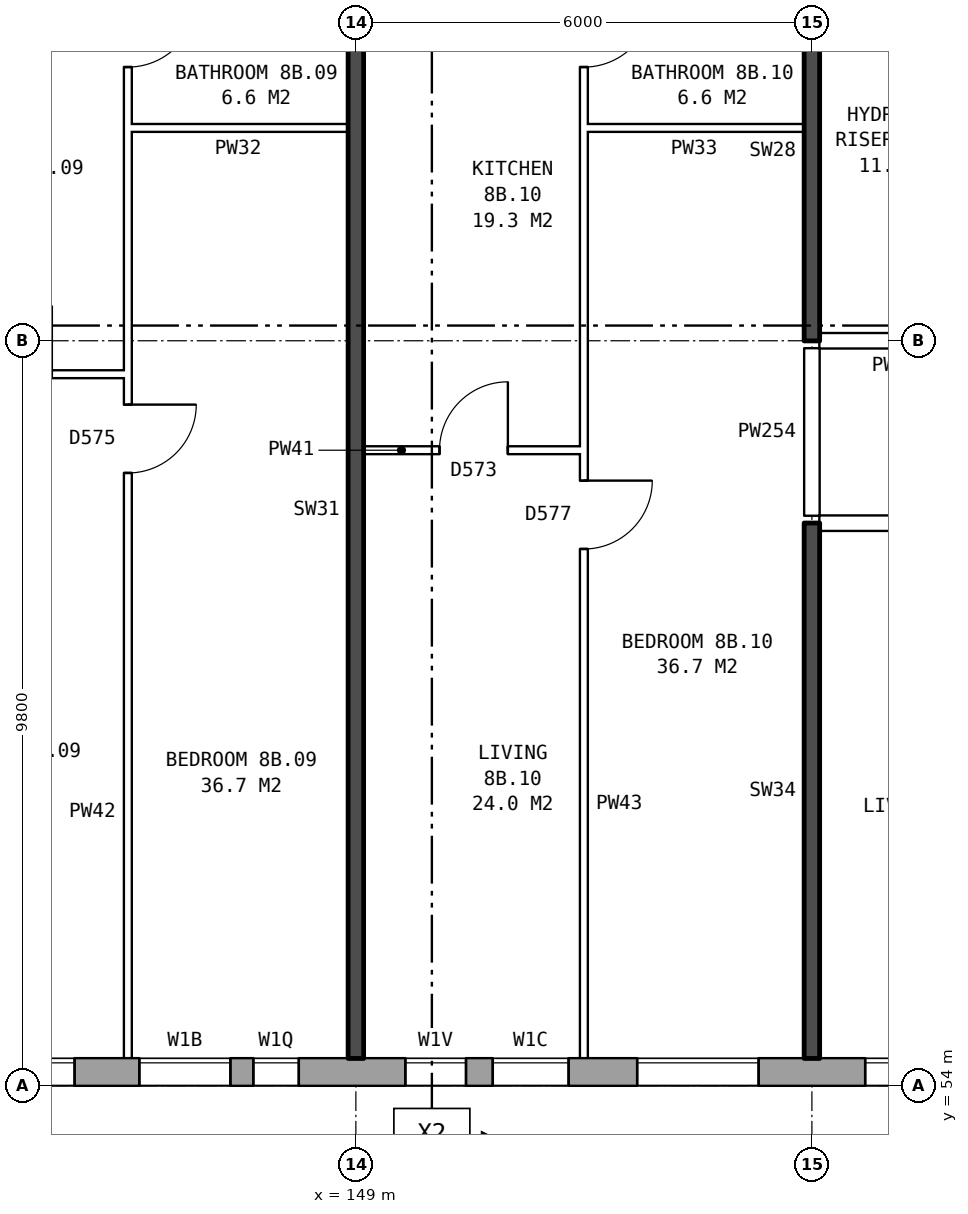
"""IFC4 building model, lengths in metres.
Left out: names, types, materials, properties, quantities, classifications, styles, units other than length and angle.
Written with IfcOpenShell. Run it as: python <this file> out.ifc"""

import sys

from ifc_helpers import new_model, si_unit, direction, frame, frame_2d, origin, place, context, subcontext, project, spatial, rectangle, extrude, element, fill, save


model = new_model("IFC4")
c1 = context("Model", 3, precision=1e-05, world=origin(), true_north=direction((0.0, 1.0)))
c2 = subcontext(c1, "Body", "Model", "MODEL_VIEW")
j1 = project(units=[si_unit("LENGTHUNIT", "METRE"), si_unit("PLANEANGLEUNIT", "RADIAN")], contexts=[c1])
p1 = place(None, origin())
s1 = spatial("IfcSite", under=j1, at=p1, CompositionType="ELEMENT")
p2 = place(p1, origin())
s2 = spatial("IfcBuilding", under=s1, at=p2, CompositionType="ELEMENT")
p3 = place(p2, frame((0.0, 0.0, 31.9)))
s3 = spatial("IfcBuildingStorey", under=s2, at=p3, CompositionType="ELEMENT", Elevation=31.9)
p4 = place(p3, frame((134.075, 54.18, 0.0), z_axis=(0.0, 0.0, 1.0), x_axis=(1.0, 0.0, 0.0)))
e1 = element("IfcWall", 1, at=p4, inside=s3, PredefinedType="STANDARD", context=c2, shape_type="SweptSolid", body=[
    extrude(rectangle(XDim=40.601, YDim=0.36, at=frame_2d((20.3, 0.0))), origin(), (0.0, 0.0, 1.0), 2.85),
])
p5 = place(p4, frame((0.625, 0.0, 0.8)))
e2 = element("IfcOpeningElement", 2, at=p5, cuts=e1, PredefinedType="OPENING", context=c2, shape_type="SweptSolid", body=[
    extrude(rectangle(XDim=1.6, YDim=1.8, at=frame_2d((0.8, 0.9))), frame((0.0, 0.19, 0.0), z_axis=(0.0, -1.0, 0.0), x_axis=(1.0, 0.0, 0.0)), (0.0, 0.0, 1.0), 0.38),
])
p6 = place(p4, frame((3.625, 0.0, 0.8)))
e3 = element("IfcOpeningElement", 3, at=p6, cuts=e1, PredefinedType="OPENING", context=c2, shape_type="SweptSolid", body=[
    extrude(rectangle(XDim=1.6, YDim=1.8, at=frame_2d((0.8, 0.9))), frame((0.0, 0.19, 0.0), z_axis=(0.0, -1.0, 0.0), x_axis=(1.0, 0.0, 0.0)), (0.0, 0.0, 1.0), 0.38),
])
p7 = place(p4, frame((6.625, 0.0, 0.8)))
e4 = element("IfcOpeningElement", 4, at=p7, cuts=e1, PredefinedType="OPENING", context=c2, shape_type="SweptSolid", body=[
    extrude(rectangle(XDim=1.6, YDim=1.8, at=frame_2d((0.8, 0.9))), frame((0.0, 0.19, 0.0), z_axis=(0.0, -1.0, 0.0), x_axis=(1.0, 0.0, 0.0)), (0.0, 0.0, 1.0), 0.38),
])
p8 = place(p4, frame((9.625, 0.0, 0.8)))
e5 = element("IfcOpeningElement", 5, at=p8, cuts=e1, PredefinedType="OPENING", context=c2, shape_type="SweptSolid", body=[
    extrude(rectangle(XDim=1.6, YDim=1.8, at=frame_2d((0.8, 0.9))), frame((0.0, 0.19, 0.0), z_axis=(0.0, -1.0, 0.0), x_axis=(1.0, 0.0, 0.0)), (0.0, 0.0, 1.0), 0.38),
])
p9 = place(p4, frame((12.075, 0.0, 0.8)))
e6 = element("IfcOpeningElement", 6, at=p9, cuts=e1, PredefinedType="OPENING", context=c2, shape_type="SweptSolid", body=[
    extrude(rectangle(XDim=1.2, YDim=1.8, at=frame_2d((0.6, 0.9))), frame((0.0, 0.19, 0.0), z_axis=(0.0, -1.0, 0.0), x_axis=(1.0, 0.0, 0.0)), (0.0, 0.0, 1.0), 0.38),
])
p10 = place(p4, frame((15.575, 0.0, 0.65)))
e7 = element("IfcOpeningElement", 7, at=p10, cuts=e1, PredefinedType="OPENING", context=c2, shape_type="SweptSolid", body=[
    extrude(rectangle(XDim=0.8, YDim=0.9, at=frame_2d((0.4, 0.45))), frame((0.0, 0.19, 0.0), z_axis=(0.0, -1.0, 0.0), x_axis=(1.0, 0.0, 0.0)), (0.0, 0.0, 1.0), 0.38),
])
p11 = place(p4, frame((18.625, 0.0, 0.8)))
e8 = element("IfcOpeningElement", 8, at=p11, cuts=e1, PredefinedType="OPENING", context=c2, shape_type="SweptSolid", body=[
    extrude(rectangle(XDim=1.6, YDim=1.8, at=frame_2d((0.8, 0.9))), frame((0.0, 0.19, 0.0), z_axis=(0.0, -1.0, 0.0), x_axis=(1.0, 0.0, 0.0)), (0.0, 0.0, 1.0), 0.38),
])
p12 = place(p4, frame((21.625, 0.0, 0.8)))
e9 = element("IfcOpeningElement", 9, at=p12, cuts=e1, PredefinedType="OPENING", context=c2, shape_type="SweptSolid", body=[
    extrude(rectangle(XDim=1.6, YDim=1.8, at=frame_2d((0.8, 0.9))), frame((0.0, 0.19, 0.0), z_axis=(0.0, -1.0, 0.0), x_axis=(1.0, 0.0, 0.0)), (0.0, 0.0, 1.0), 0.38),
])
p13 = place(p4, frame((23.525, 0.0, 0.8)))
e10 = element("IfcOpeningElement", 10, at=p13, cuts=e1, PredefinedType="OPENING", context=c2, shape_type="SweptSolid", body=[
    extrude(rectangle(XDim=1.2, YDim=0.9, at=frame_2d((0.6, 0.45))), frame((0.0, 0.19, 0.0), z_axis=(0.0, -1.0, 0.0), x_axis=(1.0, 0.0, 0.0)), (0.0, 0.0, 1.0), 0.38),
])
p14 = place(p4, frame((27.625, 0.0, 0.8)))
e11 = element("IfcOpeningElement", 11, at=p14, cuts=e1, PredefinedType="OPENING", context=c2, shape_type="SweptSolid", body=[
    extrude(rectangle(XDim=1.6, YDim=1.8, at=frame_2d((0.8, 0.9))), frame((0.0, 0.19, 0.0), z_axis=(0.0, -1.0, 0.0), x_axis=(1.0, 0.0, 0.0)), (0.0, 0.0, 1.0), 0.38),
])
p15 = place(p4, frame((30.625, 0.0, 0.8)))
e12 = element("IfcOpeningElement", 12, at=p15, cuts=e1, PredefinedType="OPENING", context=c2, shape_type="SweptSolid", body=[
    extrude(rectangle(XDim=1.6, YDim=1.8, at=frame_2d((0.8, 0.9))), frame((0.0, 0.19, 0.0), z_axis=(0.0, -1.0, 0.0), x_axis=(1.0, 0.0, 0.0)), (0.0, 0.0, 1.0), 0.38),
])
p16 = place(p4, frame((33.625, 0.0, 0.8)))
e13 = element("IfcOpeningElement", 13, at=p16, cuts=e1, PredefinedType="OPENING", context=c2, shape_type="SweptSolid", body=[
    extrude(rectangle(XDim=1.6, YDim=1.8, at=frame_2d((0.8, 0.9))), frame((0.0, 0.19, 0.0), z_axis=(0.0, -1.0, 0.0), x_axis=(1.0, 0.0, 0.0)), (0.0, 0.0, 1.0), 0.38),
])
p17 = place(p4, frame((36.625, 0.0, 0.8)))
e14 = element("IfcOpeningElement", 14, at=p17, cuts=e1, PredefinedType="OPENING", context=c2, shape_type="SweptSolid", body=[
    extrude(rectangle(XDim=1.6, YDim=1.8, at=frame_2d((0.8, 0.9))), frame((0.0, 0.19, 0.0), z_axis=(0.0, -1.0, 0.0), x_axis=(1.0, 0.0, 0.0)), (0.0, 0.0, 1.0), 0.38),
])
p18 = place(p4, frame((13.575, 0.0, 1.4)))
e15 = element("IfcOpeningElement", 15, at=p18, cuts=e1, PredefinedType="OPENING", context=c2, shape_type="SweptSolid", body=[
    extrude(rectangle(XDim=0.6, YDim=1.2, at=frame_2d((0.3, 0.6))), frame((0.0, 0.19, 0.0), z_axis=(0.0, -1.0, 0.0), x_axis=(1.0, 0.0, 0.0)), (0.0, 0.0, 1.0), 0.38),
])
p19 = place(p4, frame((16.725, 0.0, 0.65)))
e16 = element("IfcOpeningElement", 16, at=p19, cuts=e1, PredefinedType="OPENING", context=c2, shape_type="SweptSolid", body=[
    extrude(rectangle(XDim=1.0, YDim=1.8, at=frame_2d((0.5, 0.9))), frame((0.0, 0.19, 0.0), z_axis=(0.0, -1.0, 0.0), x_axis=(1.0, 0.0, 0.0)), (0.0, 0.0, 1.0), 0.38),
])
p20 = place(p4, frame((26.075, 0.0, 1.7)))
e17 = element("IfcOpeningElement", 17, at=p20, cuts=e1, PredefinedType="OPENING", context=c2, shape_type="SweptSolid", body=[
    extrude(rectangle(XDim=0.6, YDim=0.9, at=frame_2d((0.3, 0.45))), frame((0.0, 0.19, 0.0), z_axis=(0.0, -1.0, 0.0), x_axis=(1.0, 0.0, 0.0)), (0.0, 0.0, 1.0), 0.38),
])
p21 = place(p3, frame((155.1, 61.4, 0.0), z_axis=(0.0, 0.0, 1.0), x_axis=(1.0, 0.0, 0.0)))
e18 = element("IfcWall", 18, at=p21, inside=s3, PredefinedType="PARTITIONING", context=c2, shape_type="SweptSolid", body=[
    extrude(rectangle(XDim=22.29, YDim=0.2, at=frame_2d((11.145, 0.0))), origin(), (0.0, 0.0, 1.0), 2.85),
])
p22 = place(p21, frame((2.45, 0.0, 0.0)))
e19 = element("IfcOpeningElement", 19, at=p22, cuts=e18, PredefinedType="OPENING", context=c2, shape_type="SweptSolid", body=[
    extrude(rectangle(XDim=1.0, YDim=2.1, at=frame_2d((0.5, 1.05))), frame((0.0, 0.11, 0.0), z_axis=(0.0, -1.0, 0.0), x_axis=(1.0, 0.0, 0.0)), (0.0, 0.0, 1.0), 0.22),
])
p23 = place(p21, frame((14.4, 0.0, 0.0)))
e20 = element("IfcOpeningElement", 20, at=p23, cuts=e18, PredefinedType="OPENING", context=c2, shape_type="SweptSolid", body=[
    extrude(rectangle(XDim=1.0, YDim=2.1, at=frame_2d((0.5, 1.05))), frame((0.0, 0.11, 0.0), z_axis=(0.0, -1.0, 0.0), x_axis=(1.0, 0.0, 0.0)), (0.0, 0.0, 1.0), 0.22),
])
p24 = place(p3, frame((149.1, 62.36, 0.0), z_axis=(0.0, 0.0, 1.0), x_axis=(1.0, 0.0, 0.0)))
e21 = element("IfcWall", 21, at=p24, inside=s3, PredefinedType="PARTITIONING", context=c2, shape_type="SweptSolid", body=[
    extrude(rectangle(XDim=2.9, YDim=0.1, at=frame_2d((1.45, 0.0))), origin(), (0.0, 0.0, 1.0), 2.85),
])
p25 = place(p24, frame((1.0, 0.0, 0.0)))
e22 = element("IfcOpeningElement", 22, at=p25, cuts=e21, PredefinedType="OPENING", context=c2, shape_type="SweptSolid", body=[
    extrude(rectangle(XDim=0.9, YDim=2.1, at=frame_2d((0.45, 1.05))), frame((0.0, 0.06, 0.0), z_axis=(0.0, -1.0, 0.0), x_axis=(1.0, 0.0, 0.0)), (0.0, 0.0, 1.0), 0.12),
])
p26 = place(p3, frame((143.1, 63.36, 0.0), z_axis=(0.0, 0.0, 1.0), x_axis=(1.0, 0.0, 0.0)))
e23 = element("IfcWall", 23, at=p26, inside=s3, PredefinedType="PARTITIONING", context=c2, shape_type="SweptSolid", body=[
    extrude(rectangle(XDim=2.9, YDim=0.1, at=frame_2d((1.45, 0.0))), origin(), (0.0, 0.0, 1.0), 2.85),
])
p27 = place(p26, frame((1.0, 0.0, 0.0)))
e24 = element("IfcOpeningElement", 24, at=p27, cuts=e23, PredefinedType="OPENING", context=c2, shape_type="SweptSolid", body=[
    extrude(rectangle(XDim=0.9, YDim=2.1, at=frame_2d((0.45, 1.05))), frame((0.0, 0.06, 0.0), z_axis=(0.0, -1.0, 0.0), x_axis=(1.0, 0.0, 0.0)), (0.0, 0.0, 1.0), 0.12),
])
p28 = place(p3, frame((155.1, 63.8, 0.0), z_axis=(0.0, 0.0, 1.0), x_axis=(1.0, 0.0, 0.0)))
e25 = element("IfcWall", 25, at=p28, inside=s3, PredefinedType="PARTITIONING", context=c2, shape_type="SweptSolid", body=[
    extrude(rectangle(XDim=2.14, YDim=0.2, at=frame_2d((1.07, 0.0))), origin(), (0.0, 0.0, 1.0), 2.85),
])
for number, where, z_axis, x_axis in (
    (26, (146.0, 66.6, 0.0), (0.0, 0.0, 1.0), (1.0, 0.0, 0.0)),
    (27, (152.0, 66.6, 0.0), (0.0, 0.0, 1.0), (1.0, 0.0, 0.0)),
):
    element("IfcWall", number, at=place(p3, frame(where, z_axis=z_axis, x_axis=x_axis)), inside=s3, PredefinedType="PARTITIONING", context=c2, shape_type="SweptSolid", body=[
        extrude(rectangle(XDim=2.9, YDim=0.1, at=frame_2d((1.45, 0.0))), origin(), (0.0, 0.0, 1.0), 2.85),
    ])
p29 = place(p3, frame((146.0, 54.36, 0.0), z_axis=(0.0, 0.0, 1.0), x_axis=(0.0, 1.0, 0.0)))
e28 = element("IfcWall", 28, at=p29, inside=s3, PredefinedType="PARTITIONING", context=c2, shape_type="SweptSolid", body=[
    extrude(rectangle(XDim=14.34, YDim=0.1, at=frame_2d((7.17, 0.0))), origin(), (0.0, 0.0, 1.0), 2.85),
])
p30 = place(p29, frame((7.7, 0.0, 0.0)))
e29 = element("IfcOpeningElement", 29, at=p30, cuts=e28, PredefinedType="OPENING", context=c2, shape_type="SweptSolid", body=[
    extrude(rectangle(XDim=0.9, YDim=2.1, at=frame_2d((0.45, 1.05))), frame((0.0, 0.06, 0.0), z_axis=(0.0, -1.0, 0.0), x_axis=(1.0, 0.0, 0.0)), (0.0, 0.0, 1.0), 0.12),
])
p31 = place(p29, frame((13.04, 0.0, 0.0)))
e30 = element("IfcOpeningElement", 30, at=p31, cuts=e28, PredefinedType="OPENING", context=c2, shape_type="SweptSolid", body=[
    extrude(rectangle(XDim=0.9, YDim=2.1, at=frame_2d((0.45, 1.05))), frame((0.0, 0.06, 0.0), z_axis=(0.0, -1.0, 0.0), x_axis=(1.0, 0.0, 0.0)), (0.0, 0.0, 1.0), 0.12),
])
p32 = place(p3, frame((149.0, 54.36, 0.0), z_axis=(0.0, 0.0, 1.0), x_axis=(0.0, 1.0, 0.0)))
e31 = element("IfcWall", 31, at=p32, inside=s3, PredefinedType="SOLIDWALL", context=c2, shape_type="SweptSolid", body=[
    extrude(rectangle(XDim=14.44, YDim=0.2, at=frame_2d((7.22, 0.0))), origin(), (0.0, 0.0, 1.0), 2.85),
])
p33 = place(p3, frame((152.0, 54.36, 0.0), z_axis=(0.0, 0.0, 1.0), x_axis=(0.0, 1.0, 0.0)))
e32 = element("IfcWall", 32, at=p33, inside=s3, PredefinedType="PARTITIONING", context=c2, shape_type="SweptSolid", body=[
    extrude(rectangle(XDim=14.34, YDim=0.1, at=frame_2d((7.17, 0.0))), origin(), (0.0, 0.0, 1.0), 2.85),
])
p34 = place(p33, frame((6.7, 0.0, 0.0)))
e33 = element("IfcOpeningElement", 33, at=p34, cuts=e32, PredefinedType="OPENING", context=c2, shape_type="SweptSolid", body=[
    extrude(rectangle(XDim=0.9, YDim=2.1, at=frame_2d((0.45, 1.05))), frame((0.0, 0.06, 0.0), z_axis=(0.0, -1.0, 0.0), x_axis=(1.0, 0.0, 0.0)), (0.0, 0.0, 1.0), 0.12),
])
p35 = place(p33, frame((13.04, 0.0, 0.0)))
e34 = element("IfcOpeningElement", 34, at=p35, cuts=e32, PredefinedType="OPENING", context=c2, shape_type="SweptSolid", body=[
    extrude(rectangle(XDim=0.9, YDim=2.1, at=frame_2d((0.45, 1.05))), frame((0.0, 0.06, 0.0), z_axis=(0.0, -1.0, 0.0), x_axis=(1.0, 0.0, 0.0)), (0.0, 0.0, 1.0), 0.12),
])
p36 = place(p3, frame((155.0, 54.36, 0.0), z_axis=(0.0, 0.0, 1.0), x_axis=(0.0, 1.0, 0.0)))
e35 = element("IfcWall", 35, at=p36, inside=s3, PredefinedType="SOLIDWALL", context=c2, shape_type="SweptSolid", body=[
    extrude(rectangle(XDim=7.04, YDim=0.2, at=frame_2d((3.52, 0.0))), origin(), (0.0, 0.0, 1.0), 2.85),
])
p37 = place(p3, frame((155.0, 61.5, 0.0), z_axis=(0.0, 0.0, 1.0), x_axis=(0.0, 1.0, 0.0)))
e36 = element("IfcWall", 36, at=p37, inside=s3, PredefinedType="PARTITIONING", context=c2, shape_type="SweptSolid", body=[
    extrude(rectangle(XDim=2.2, YDim=0.2, at=frame_2d((1.1, 0.0))), origin(), (0.0, 0.0, 1.0), 2.85),
])
p38 = place(p3, frame((155.0, 63.8, 0.0), z_axis=(0.0, 0.0, 1.0), x_axis=(0.0, 1.0, 0.0)))
e37 = element("IfcWall", 37, at=p38, inside=s3, PredefinedType="SOLIDWALL", context=c2, shape_type="SweptSolid", body=[
    extrude(rectangle(XDim=5.0, YDim=0.2, at=frame_2d((2.5, 0.0))), origin(), (0.0, 0.0, 1.0), 2.85),
])
p39 = place(p8, origin())
e38 = element("IfcWindow", 38, at=p39, inside=s3, PartitioningType="SINGLE_PANEL", PredefinedType="WINDOW", context=c2, shape_type="SweptSolid", body=[
    extrude(rectangle(XDim=1.6, YDim=1.8, at=frame_2d((0.8, 0.9))), frame((0.0, 0.15, 0.0), z_axis=(0.0, -1.0, 0.0), x_axis=(1.0, 0.0, 0.0)), (0.0, 0.0, 1.0), 0.06),
])
fill(e5, e38)
p40 = place(p9, origin())
e39 = element("IfcWindow", 39, at=p40, inside=s3, PartitioningType="SINGLE_PANEL", PredefinedType="WINDOW", context=c2, shape_type="SweptSolid", body=[
    extrude(rectangle(XDim=1.2, YDim=1.8, at=frame_2d((0.6, 0.9))), frame((0.0, 0.15, 0.0), z_axis=(0.0, -1.0, 0.0), x_axis=(1.0, 0.0, 0.0)), (0.0, 0.0, 1.0), 0.06),
])
fill(e6, e39)
p41 = place(p10, origin())
e40 = element("IfcWindow", 40, at=p41, inside=s3, PartitioningType="SINGLE_PANEL", PredefinedType="WINDOW", context=c2, shape_type="SweptSolid", body=[
    extrude(rectangle(XDim=0.8, YDim=0.9, at=frame_2d((0.4, 0.45))), frame((0.0, 0.15, 0.0), z_axis=(0.0, -1.0, 0.0), x_axis=(1.0, 0.0, 0.0)), (0.0, 0.0, 1.0), 0.06),
])
fill(e7, e40)
p42 = place(p11, origin())
e41 = element("IfcWindow", 41, at=p42, inside=s3, PartitioningType="SINGLE_PANEL", PredefinedType="WINDOW", context=c2, shape_type="SweptSolid", body=[
    extrude(rectangle(XDim=1.6, YDim=1.8, at=frame_2d((0.8, 0.9))), frame((0.0, 0.15, 0.0), z_axis=(0.0, -1.0, 0.0), x_axis=(1.0, 0.0, 0.0)), (0.0, 0.0, 1.0), 0.06),
])
fill(e8, e41)
p43 = place(p12, origin())
e42 = element("IfcWindow", 42, at=p43, inside=s3, PartitioningType="SINGLE_PANEL", PredefinedType="WINDOW", context=c2, shape_type="SweptSolid", body=[
    extrude(rectangle(XDim=1.6, YDim=1.8, at=frame_2d((0.8, 0.9))), frame((0.0, 0.15, 0.0), z_axis=(0.0, -1.0, 0.0), x_axis=(1.0, 0.0, 0.0)), (0.0, 0.0, 1.0), 0.06),
])
fill(e9, e42)
p44 = place(p30, frame((0.9, 0.0, 0.0), z_axis=(0.0, 0.0, 1.0), x_axis=(-1.0, 0.0, 0.0)))
e43 = element("IfcDoor", 43, at=p44, inside=s3, OperationType="SINGLE_SWING_LEFT", PredefinedType="DOOR", context=c2, shape_type="SweptSolid", body=[
    extrude(rectangle(XDim=0.9, YDim=2.1, at=frame_2d((0.45, 1.05))), frame((0.0, 0.025, 0.0), z_axis=(0.0, -1.0, 0.0), x_axis=(1.0, 0.0, 0.0)), (0.0, 0.0, 1.0), 0.05),
])
fill(e29, e43)
p45 = place(p31, frame((0.9, 0.0, 0.0), z_axis=(0.0, 0.0, 1.0), x_axis=(-1.0, 0.0, 0.0)))
e44 = element("IfcDoor", 44, at=p45, inside=s3, OperationType="SINGLE_SWING_LEFT", PredefinedType="DOOR", context=c2, shape_type="SweptSolid", body=[
    extrude(rectangle(XDim=0.9, YDim=2.1, at=frame_2d((0.45, 1.05))), frame((0.0, 0.025, 0.0), z_axis=(0.0, -1.0, 0.0), x_axis=(1.0, 0.0, 0.0)), (0.0, 0.0, 1.0), 0.05),
])
fill(e30, e44)
p46 = place(p34, frame((0.9, 0.0, 0.0), z_axis=(0.0, 0.0, 1.0), x_axis=(-1.0, 0.0, 0.0)))
e45 = element("IfcDoor", 45, at=p46, inside=s3, OperationType="SINGLE_SWING_LEFT", PredefinedType="DOOR", context=c2, shape_type="SweptSolid", body=[
    extrude(rectangle(XDim=0.9, YDim=2.1, at=frame_2d((0.45, 1.05))), frame((0.0, 0.025, 0.0), z_axis=(0.0, -1.0, 0.0), x_axis=(1.0, 0.0, 0.0)), (0.0, 0.0, 1.0), 0.05),
])
fill(e33, e45)
p47 = place(p25, origin())
e46 = element("IfcDoor", 46, at=p47, inside=s3, OperationType="SINGLE_SWING_RIGHT", PredefinedType="DOOR", context=c2, shape_type="SweptSolid", body=[
    extrude(rectangle(XDim=0.9, YDim=2.1, at=frame_2d((0.45, 1.05))), frame((0.0, 0.025, 0.0), z_axis=(0.0, -1.0, 0.0), x_axis=(1.0, 0.0, 0.0)), (0.0, 0.0, 1.0), 0.05),
])
fill(e22, e46)
p48 = place(p35, frame((0.9, 0.0, 0.0), z_axis=(0.0, 0.0, 1.0), x_axis=(-1.0, 0.0, 0.0)))
e47 = element("IfcDoor", 47, at=p48, inside=s3, OperationType="SINGLE_SWING_LEFT", PredefinedType="DOOR", context=c2, shape_type="SweptSolid", body=[
    extrude(rectangle(XDim=0.9, YDim=2.1, at=frame_2d((0.45, 1.05))), frame((0.0, 0.025, 0.0), z_axis=(0.0, -1.0, 0.0), x_axis=(1.0, 0.0, 0.0)), (0.0, 0.0, 1.0), 0.05),
])
fill(e34, e47)
p49 = place(p18, origin())
e48 = element("IfcWindow", 48, at=p49, inside=s3, PartitioningType="SINGLE_PANEL", PredefinedType="WINDOW", context=c2, shape_type="SweptSolid", body=[
    extrude(rectangle(XDim=0.6, YDim=1.2, at=frame_2d((0.3, 0.6))), frame((0.0, 0.15, 0.0), z_axis=(0.0, -1.0, 0.0), x_axis=(1.0, 0.0, 0.0)), (0.0, 0.0, 1.0), 0.06),
])
fill(e15, e48)
p50 = place(p19, origin())
e49 = element("IfcWindow", 49, at=p50, inside=s3, PartitioningType="SINGLE_PANEL", PredefinedType="WINDOW", context=c2, shape_type="SweptSolid", body=[
    extrude(rectangle(XDim=1.0, YDim=1.8, at=frame_2d((0.5, 0.9))), frame((0.0, 0.15, 0.0), z_axis=(0.0, -1.0, 0.0), x_axis=(1.0, 0.0, 0.0)), (0.0, 0.0, 1.0), 0.06),
])
fill(e16, e49)
save(model, sys.argv[1])
